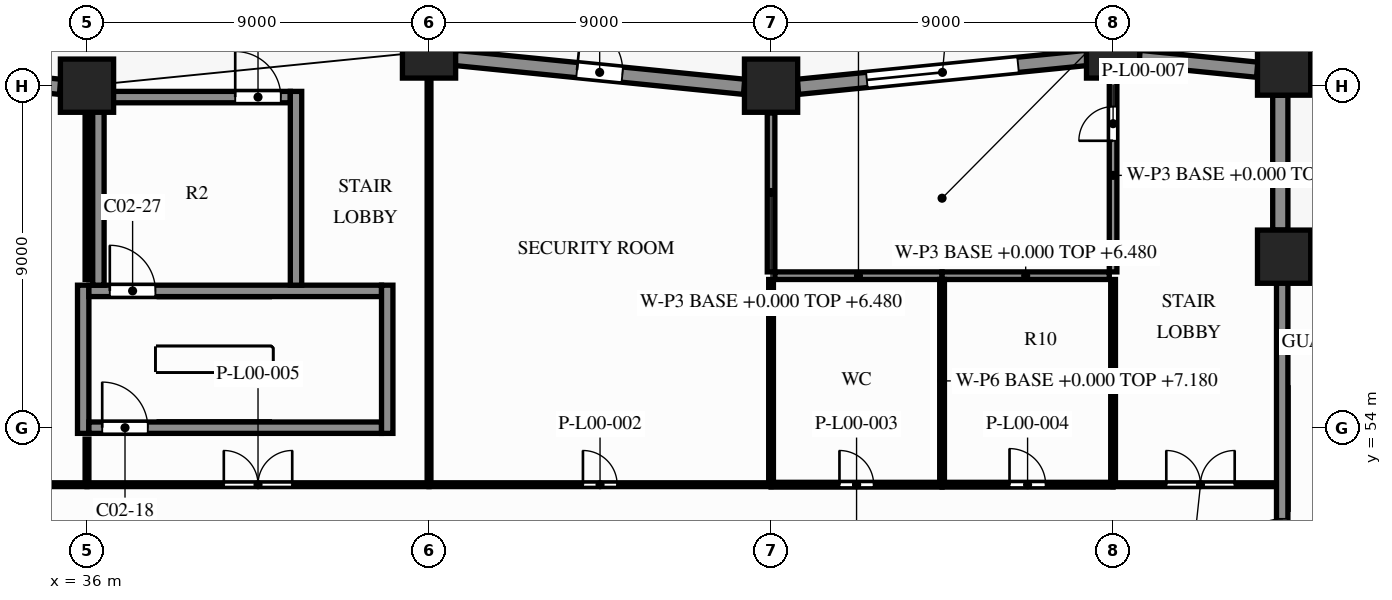
"""IFC4 building model, lengths in metres.
Left out: names, types, materials, properties, quantities, classifications, styles, units other than length and angle.
Written with IfcOpenShell. Run it as: python <this file> out.ifc"""

import sys

from ifc_helpers import new_model, si_unit, direction, frame, frame_2d, origin, origin_2d, place, context, subcontext, project, spatial, rectangle, extrude, element, fill, save


model = new_model("IFC4")
c1 = context("Model", 3, precision=1e-05, world=origin(), true_north=direction((0.0, 1.0)))
c2 = subcontext(c1, "Body", "Model", "MODEL_VIEW")
j1 = project(units=[si_unit("LENGTHUNIT", "METRE"), si_unit("PLANEANGLEUNIT", "RADIAN")], contexts=[c1])
p1 = place(None, origin())
s1 = spatial("IfcSite", under=j1, at=p1, CompositionType="ELEMENT")
p2 = place(p1, origin())
s2 = spatial("IfcBuilding", under=s1, at=p2, CompositionType="ELEMENT")
p3 = place(p2, origin())
s3 = spatial("IfcBuildingStorey", under=s2, at=p3, CompositionType="ELEMENT", Elevation=0.0)
for number, where, z_axis, x_axis in (
    (1, (67.5, 63.45, 0.0), (0.0, 0.0, 1.0), (1.0, 0.0, 0.0)),
    (2, (63.0, 63.9, 0.0), (0.0, 0.0, 1.0), (1.0, 0.0, 0.0)),
    (3, (54.0, 63.0, 0.0), (0.0, 0.0, 1.0), (1.0, 0.0, 0.0)),
    (4, (45.0, 63.9, 0.0), (0.0, 0.0, 1.0), (1.0, 0.0, 0.0)),
    (5, (36.0, 63.0, 0.0), (0.0, 0.0, 1.0), (1.0, 0.0, 0.0)),
    (6, (67.5, 58.5, 0.0), (0.0, 0.0, 1.0), (1.0, 0.0, 0.0)),
):
    element("IfcColumn", number, at=place(p3, frame(where, z_axis=z_axis, x_axis=x_axis)), inside=s3, PredefinedType="COLUMN", context=c2, shape_type="SweptSolid", body=[
        extrude(rectangle(XDim=1.4, YDim=1.4, at=origin_2d()), origin(), (0.0, 0.0, 1.0), 7.5),
    ])
p4 = place(p3, frame((67.4, 62.75, 0.0), z_axis=(0.0, 0.0, 1.0), x_axis=(0.0, -1.0, 0.0)))
e7 = element("IfcWall", 7, at=p4, inside=s3, PredefinedType="SOLIDWALL", context=c2, shape_type="SweptSolid", body=[
    extrude(rectangle(XDim=3.55, YDim=0.4, at=frame_2d((1.775, 0.0))), origin(), (0.0, 0.0, 1.0), 6.6),
])
p5 = place(p3, frame((63.687, 63.731, 0.0), z_axis=(0.0, 0.0, 1.0), x_axis=(0.995041834057, -0.099457269599, 0.0)))
e8 = element("IfcWall", 8, at=p5, inside=s3, PredefinedType="SOLIDWALL", context=c2, shape_type="SweptSolid", body=[
    extrude(rectangle(XDim=3.122, YDim=0.4, at=frame_2d((1.561, 0.0))), origin(), (0.0, 0.0, 1.0), 6.6),
])
p6 = place(p3, frame((54.707, 62.97, 0.0), z_axis=(0.0, 0.0, 1.0), x_axis=(0.995039719416, 0.099478423711, 0.0)))
e9 = element("IfcWall", 9, at=p6, inside=s3, PredefinedType="SOLIDWALL", context=c2, shape_type="SweptSolid", body=[
    extrude(rectangle(XDim=7.645, YDim=0.4, at=frame_2d((3.822, 0.0))), origin(), (0.0, 0.0, 1.0), 6.6),
])
p7 = place(p6, frame((1.823, 0.0, 0.0)))
e10 = element("IfcOpeningElement", 10, at=p7, cuts=e9, PredefinedType="OPENING", context=c2, shape_type="SweptSolid", body=[
    extrude(rectangle(XDim=4.0, YDim=4.0, at=frame_2d((2.0, 2.0))), frame((0.0, 0.21, 0.0), z_axis=(0.0, -1.0, 0.0), x_axis=(1.0, 0.0, 0.0)), (0.0, 0.0, 1.0), 0.42),
])
p8 = place(p3, frame((45.687, 63.731, 0.0), z_axis=(0.0, 0.0, 1.0), x_axis=(0.995039719416, -0.099478423711, 0.0)))
e11 = element("IfcWall", 11, at=p8, inside=s3, PredefinedType="SOLIDWALL", context=c2, shape_type="SweptSolid", body=[
    extrude(rectangle(XDim=7.645, YDim=0.4, at=frame_2d((3.822, 0.0))), origin(), (0.0, 0.0, 1.0), 6.6),
])
p9 = place(p8, frame((3.222, 0.0, 0.0)))
e12 = element("IfcOpeningElement", 12, at=p9, cuts=e11, PredefinedType="OPENING", context=c2, shape_type="SweptSolid", body=[
    extrude(rectangle(XDim=1.2, YDim=2.4, at=frame_2d((0.6, 1.2))), frame((0.0, 0.21, 0.0), z_axis=(0.0, -1.0, 0.0), x_axis=(1.0, 0.0, 0.0)), (0.0, 0.0, 1.0), 0.42),
])
p10 = place(p3, frame((27.687, 63.731, 0.0), z_axis=(0.0, 0.0, 1.0), x_axis=(0.995039719416, -0.099478423711, 0.0)))
e13 = element("IfcWall", 13, at=p10, inside=s3, PredefinedType="SOLIDWALL", context=c2, shape_type="SweptSolid", body=[
    extrude(rectangle(XDim=7.645, YDim=0.4, at=frame_2d((3.822, 0.0))), origin(), (0.0, 0.0, 1.0), 6.6),
])
p11 = place(p10, frame((3.222, 0.0, 0.0)))
e14 = element("IfcOpeningElement", 14, at=p11, cuts=e13, PredefinedType="OPENING", context=c2, shape_type="SweptSolid", body=[
    extrude(rectangle(XDim=1.2, YDim=2.4, at=frame_2d((0.6, 1.2))), frame((0.0, 0.21, 0.0), z_axis=(0.0, -1.0, 0.0), x_axis=(1.0, 0.0, 0.0)), (0.0, 0.0, 1.0), 0.42),
])
p12 = place(p3, frame((36.05, 54.0, 0.0), z_axis=(0.0, 0.0, 1.0), x_axis=(1.0, 0.0, 0.0)))
e15 = element("IfcWall", 15, at=p12, inside=s3, PredefinedType="SHEAR", context=c2, shape_type="SweptSolid", body=[
    extrude(rectangle(XDim=7.7, YDim=0.3, at=frame_2d((3.85, 0.0))), origin(), (0.0, 0.0, 1.0), 7.2),
])
p13 = place(p12, frame((0.35, 0.0, 0.0)))
e16 = element("IfcOpeningElement", 16, at=p13, cuts=e15, PredefinedType="OPENING", context=c2, shape_type="SweptSolid", body=[
    extrude(rectangle(XDim=1.2, YDim=2.2, at=frame_2d((0.6, 1.1))), frame((0.0, 0.16, 0.0), z_axis=(0.0, -1.0, 0.0), x_axis=(1.0, 0.0, 0.0)), (0.0, 0.0, 1.0), 0.32),
])
p14 = place(p3, frame((36.05, 57.6, 0.0), z_axis=(0.0, 0.0, 1.0), x_axis=(1.0, 0.0, 0.0)))
e17 = element("IfcWall", 17, at=p14, inside=s3, PredefinedType="SHEAR", context=c2, shape_type="SweptSolid", body=[
    extrude(rectangle(XDim=7.7, YDim=0.3, at=frame_2d((3.85, 0.0))), origin(), (0.0, 0.0, 1.0), 7.2),
])
p15 = place(p14, frame((0.55, 0.0, 0.0)))
e18 = element("IfcOpeningElement", 18, at=p15, cuts=e17, PredefinedType="OPENING", context=c2, shape_type="SweptSolid", body=[
    extrude(rectangle(XDim=1.2, YDim=2.2, at=frame_2d((0.6, 1.1))), frame((0.0, 0.16, 0.0), z_axis=(0.0, -1.0, 0.0), x_axis=(1.0, 0.0, 0.0)), (0.0, 0.0, 1.0), 0.32),
])
p16 = place(p3, frame((67.6, 58.15, 0.0), z_axis=(0.0, 0.0, 1.0), x_axis=(1.0, 0.0, 0.0)))
e19 = element("IfcWall", 19, at=p16, inside=s3, PredefinedType="SHEAR", context=c2, shape_type="SweptSolid", body=[
    extrude(rectangle(XDim=3.9, YDim=0.3, at=frame_2d((1.95, 0.0))), origin(), (0.0, 0.0, 1.0), 7.2),
])
p17 = place(p3, frame((36.45, 62.7, 0.0), z_axis=(0.0, 0.0, 1.0), x_axis=(1.0, 0.0, 0.0)))
e20 = element("IfcWall", 20, at=p17, inside=s3, PredefinedType="SHEAR", context=c2, shape_type="SweptSolid", body=[
    extrude(rectangle(XDim=4.9, YDim=0.3, at=frame_2d((2.45, 0.0))), origin(), (0.0, 0.0, 1.0), 7.2),
])
p18 = place(p17, frame((3.45, 0.0, 0.0)))
e21 = element("IfcOpeningElement", 21, at=p18, cuts=e20, PredefinedType="OPENING", context=c2, shape_type="SweptSolid", body=[
    extrude(rectangle(XDim=1.2, YDim=2.2, at=frame_2d((0.6, 1.1))), frame((0.0, 0.16, 0.0), z_axis=(0.0, -1.0, 0.0), x_axis=(1.0, 0.0, 0.0)), (0.0, 0.0, 1.0), 0.32),
])
p19 = place(p3, frame((35.9, 53.85, 0.0), z_axis=(0.0, 0.0, 1.0), x_axis=(0.0, 1.0, 0.0)))
e22 = element("IfcWall", 22, at=p19, inside=s3, PredefinedType="SHEAR", context=c2, shape_type="SweptSolid", body=[
    extrude(rectangle(XDim=3.9, YDim=0.3, at=frame_2d((1.95, 0.0))), origin(), (0.0, 0.0, 1.0), 7.2),
])
for number, where, z_axis, x_axis in (
    (23, (36.3, 57.75, 0.0), (0.0, 0.0, 1.0), (0.0, 1.0, 0.0)),
    (24, (41.5, 57.75, 0.0), (0.0, 0.0, 1.0), (0.0, 1.0, 0.0)),
):
    element("IfcWall", number, at=place(p3, frame(where, z_axis=z_axis, x_axis=x_axis)), inside=s3, PredefinedType="SHEAR", context=c2, shape_type="SweptSolid", body=[
        extrude(rectangle(XDim=5.1, YDim=0.3, at=frame_2d((2.55, 0.0))), origin(), (0.0, 0.0, 1.0), 7.2),
    ])
p20 = place(p3, frame((43.9, 53.85, 0.0), z_axis=(0.0, 0.0, 1.0), x_axis=(0.0, 1.0, 0.0)))
e25 = element("IfcWall", 25, at=p20, inside=s3, PredefinedType="SHEAR", context=c2, shape_type="SweptSolid", body=[
    extrude(rectangle(XDim=3.9, YDim=0.3, at=frame_2d((1.95, 0.0))), origin(), (0.0, 0.0, 1.0), 7.2),
])
p21 = place(p3, frame((67.45, 49.7, 0.0), z_axis=(0.0, 0.0, 1.0), x_axis=(0.0, 1.0, 0.0)))
e26 = element("IfcWall", 26, at=p21, inside=s3, PredefinedType="SHEAR", context=c2, shape_type="SweptSolid", body=[
    extrude(rectangle(XDim=8.6, YDim=0.3, at=frame_2d((4.3, 0.0))), origin(), (0.0, 0.0, 1.0), 7.2),
])
p22 = place(p21, frame((0.7, 0.0, 0.0)))
e27 = element("IfcOpeningElement", 27, at=p22, cuts=e26, PredefinedType="OPENING", context=c2, shape_type="SweptSolid", body=[
    extrude(rectangle(XDim=1.2, YDim=2.2, at=frame_2d((0.6, 1.1))), frame((0.0, 0.16, 0.0), z_axis=(0.0, -1.0, 0.0), x_axis=(1.0, 0.0, 0.0)), (0.0, 0.0, 1.0), 0.32),
])
p23 = place(p3, frame((27.15, 52.5, 0.0), z_axis=(0.0, 0.0, 1.0), x_axis=(1.0, 0.0, 0.0)))
e28 = element("IfcWall", 28, at=p23, inside=s3, PredefinedType="PARTITIONING", context=c2, shape_type="SweptSolid", body=[
    extrude(rectangle(XDim=8.85, YDim=0.1, at=frame_2d((4.425, 0.0))), origin(), (0.0, 0.0, 1.0), 6.48),
])
p24 = place(p23, frame((3.9, 0.0, 0.0)))
e29 = element("IfcOpeningElement", 29, at=p24, cuts=e28, PredefinedType="OPENING", context=c2, shape_type="SweptSolid", body=[
    extrude(rectangle(XDim=0.9, YDim=2.1, at=frame_2d((0.45, 1.05))), frame((0.0, 0.06, 0.0), z_axis=(0.0, -1.0, 0.0), x_axis=(1.0, 0.0, 0.0)), (0.0, 0.0, 1.0), 0.12),
])
p25 = place(p3, frame((36.0, 52.5, 0.0), z_axis=(0.0, 0.0, 1.0), x_axis=(1.0, 0.0, 0.0)))
e30 = element("IfcWall", 30, at=p25, inside=s3, PredefinedType="PARTITIONING", context=c2, shape_type="SweptSolid", body=[
    extrude(rectangle(XDim=9.0, YDim=0.1, at=frame_2d((4.5, 0.0))), origin(), (0.0, 0.0, 1.0), 6.48),
])
p26 = place(p25, frame((3.6, 0.0, 0.0)))
e31 = element("IfcOpeningElement", 31, at=p26, cuts=e30, PredefinedType="OPENING", context=c2, shape_type="SweptSolid", body=[
    extrude(rectangle(XDim=1.8, YDim=2.1, at=frame_2d((0.9, 1.05))), frame((0.0, 0.06, 0.0), z_axis=(0.0, -1.0, 0.0), x_axis=(1.0, 0.0, 0.0)), (0.0, 0.0, 1.0), 0.12),
])
p27 = place(p3, frame((45.0, 52.5, 0.0), z_axis=(0.0, 0.0, 1.0), x_axis=(1.0, 0.0, 0.0)))
e32 = element("IfcWall", 32, at=p27, inside=s3, PredefinedType="PARTITIONING", context=c2, shape_type="SweptSolid", body=[
    extrude(rectangle(XDim=9.0, YDim=0.1, at=frame_2d((4.5, 0.0))), origin(), (0.0, 0.0, 1.0), 6.48),
])
p28 = place(p27, frame((4.05, 0.0, 0.0)))
e33 = element("IfcOpeningElement", 33, at=p28, cuts=e32, PredefinedType="OPENING", context=c2, shape_type="SweptSolid", body=[
    extrude(rectangle(XDim=0.9, YDim=2.1, at=frame_2d((0.45, 1.05))), frame((0.0, 0.06, 0.0), z_axis=(0.0, -1.0, 0.0), x_axis=(1.0, 0.0, 0.0)), (0.0, 0.0, 1.0), 0.12),
])
p29 = place(p3, frame((54.0, 52.5, 0.0), z_axis=(0.0, 0.0, 1.0), x_axis=(1.0, 0.0, 0.0)))
e34 = element("IfcWall", 34, at=p29, inside=s3, PredefinedType="PARTITIONING", context=c2, shape_type="SweptSolid", body=[
    extrude(rectangle(XDim=4.5, YDim=0.125, at=frame_2d((2.25, 0.0))), origin(), (0.0, 0.0, 1.0), 6.48),
])
p30 = place(p29, frame((1.8, 0.0, 0.0)))
e35 = element("IfcOpeningElement", 35, at=p30, cuts=e34, PredefinedType="OPENING", context=c2, shape_type="SweptSolid", body=[
    extrude(rectangle(XDim=0.9, YDim=2.1, at=frame_2d((0.45, 1.05))), frame((0.0, 0.073, 0.0), z_axis=(0.0, -1.0, 0.0), x_axis=(1.0, 0.0, 0.0)), (0.0, 0.0, 1.0), 0.145),
])
p31 = place(p3, frame((58.5, 52.5, 0.0), z_axis=(0.0, 0.0, 1.0), x_axis=(1.0, 0.0, 0.0)))
e36 = element("IfcWall", 36, at=p31, inside=s3, PredefinedType="PARTITIONING", context=c2, shape_type="SweptSolid", body=[
    extrude(rectangle(XDim=4.5, YDim=0.125, at=frame_2d((2.25, 0.0))), origin(), (0.0, 0.0, 1.0), 6.48),
])
p32 = place(p31, frame((1.775, 0.0, 0.0)))
e37 = element("IfcOpeningElement", 37, at=p32, cuts=e36, PredefinedType="OPENING", context=c2, shape_type="SweptSolid", body=[
    extrude(rectangle(XDim=0.95, YDim=2.1, at=frame_2d((0.475, 1.05))), frame((0.0, 0.073, 0.0), z_axis=(0.0, -1.0, 0.0), x_axis=(1.0, 0.0, 0.0)), (0.0, 0.0, 1.0), 0.145),
])
p33 = place(p3, frame((63.0, 52.5, 0.0), z_axis=(0.0, 0.0, 1.0), x_axis=(1.0, 0.0, 0.0)))
e38 = element("IfcWall", 38, at=p33, inside=s3, PredefinedType="PARTITIONING", context=c2, shape_type="SweptSolid", body=[
    extrude(rectangle(XDim=4.3, YDim=0.1, at=frame_2d((2.15, 0.0))), origin(), (0.0, 0.0, 1.0), 6.48),
])
p34 = place(p33, frame((1.4, 0.0, 0.0)))
e39 = element("IfcOpeningElement", 39, at=p34, cuts=e38, PredefinedType="OPENING", context=c2, shape_type="SweptSolid", body=[
    extrude(rectangle(XDim=1.8, YDim=2.1, at=frame_2d((0.9, 1.05))), frame((0.0, 0.06, 0.0), z_axis=(0.0, -1.0, 0.0), x_axis=(1.0, 0.0, 0.0)), (0.0, 0.0, 1.0), 0.12),
])
p35 = place(p3, frame((36.0, 53.7, 0.0), z_axis=(0.0, 0.0, 1.0), x_axis=(0.0, -1.0, 0.0)))
e40 = element("IfcWall", 40, at=p35, inside=s3, PredefinedType="PARTITIONING", context=c2, shape_type="SweptSolid", body=[
    extrude(rectangle(XDim=1.15, YDim=0.1, at=frame_2d((0.575, 0.0))), origin(), (0.0, 0.0, 1.0), 6.48),
])
p36 = place(p3, frame((54.0, 57.9, 0.0), z_axis=(0.0, 0.0, 1.0), x_axis=(0.0, -1.0, 0.0)))
e41 = element("IfcWall", 41, at=p36, inside=s3, PredefinedType="PARTITIONING", context=c2, shape_type="SweptSolid", body=[
    extrude(rectangle(XDim=5.337, YDim=0.125, at=frame_2d((2.669, 0.0))), origin(), (0.0, 0.0, 1.0), 6.48),
])
p37 = place(p3, frame((58.5, 57.9, 0.0), z_axis=(0.0, 0.0, 1.0), x_axis=(0.0, -1.0, 0.0)))
e42 = element("IfcWall", 42, at=p37, inside=s3, PredefinedType="PARTITIONING", context=c2, shape_type="SweptSolid", body=[
    extrude(rectangle(XDim=5.337, YDim=0.125, at=frame_2d((2.669, 0.0))), origin(), (0.0, 0.0, 1.0), 7.18),
])
p38 = place(p3, frame((63.0, 57.9, 0.0), z_axis=(0.0, 0.0, 1.0), x_axis=(0.0, -1.0, 0.0)))
e43 = element("IfcWall", 43, at=p38, inside=s3, PredefinedType="PARTITIONING", context=c2, shape_type="SweptSolid", body=[
    extrude(rectangle(XDim=5.337, YDim=0.125, at=frame_2d((2.669, 0.0))), origin(), (0.0, 0.0, 1.0), 6.48),
])
for number, where, z_axis, x_axis in (
    (44, (54.1, 58.0, 0.0), (0.0, 0.0, 1.0), (1.0, 0.0, 0.0)),
    (45, (58.5, 58.0, 0.0), (0.0, 0.0, 1.0), (1.0, 0.0, 0.0)),
):
    element("IfcWall", number, at=place(p3, frame(where, z_axis=z_axis, x_axis=x_axis)), inside=s3, PredefinedType="PARTITIONING", context=c2, shape_type="SweptSolid", body=[
        extrude(rectangle(XDim=4.4, YDim=0.2, at=frame_2d((2.2, 0.0))), origin(), (0.0, 0.0, 1.0), 6.48),
    ])
p39 = place(p3, frame((36.0, 62.28, 0.0), z_axis=(0.0, 0.0, 1.0), x_axis=(0.0, -1.0, 0.0)))
e46 = element("IfcWall", 46, at=p39, inside=s3, PredefinedType="PARTITIONING", context=c2, shape_type="SweptSolid", body=[
    extrude(rectangle(XDim=4.38, YDim=0.1, at=frame_2d((2.19, 0.0))), origin(), (0.0, 0.0, 1.0), 6.48),
])
p40 = place(p3, frame((54.0, 62.28, 0.0), z_axis=(0.0, 0.0, 1.0), x_axis=(0.0, -1.0, 0.0)))
e47 = element("IfcWall", 47, at=p40, inside=s3, PredefinedType="PARTITIONING", context=c2, shape_type="SweptSolid", body=[
    extrude(rectangle(XDim=4.18, YDim=0.2, at=frame_2d((2.09, 0.0))), origin(), (0.0, 0.0, 1.0), 6.48),
])
p41 = place(p3, frame((45.0, 63.18, 0.0), z_axis=(0.0, 0.0, 1.0), x_axis=(0.0, -1.0, 0.0)))
e48 = element("IfcWall", 48, at=p41, inside=s3, PredefinedType="PARTITIONING", context=c2, shape_type="SweptSolid", body=[
    extrude(rectangle(XDim=10.63, YDim=0.1, at=frame_2d((5.315, 0.0))), origin(), (0.0, 0.0, 1.0), 6.48),
])
p42 = place(p3, frame((63.0, 58.1, 0.0), z_axis=(0.0, 0.0, 1.0), x_axis=(0.0, 1.0, 0.0)))
e49 = element("IfcWall", 49, at=p42, inside=s3, PredefinedType="PARTITIONING", context=c2, shape_type="SweptSolid", body=[
    extrude(rectangle(XDim=5.08, YDim=0.2, at=frame_2d((2.54, 0.0))), origin(), (0.0, 0.0, 1.0), 6.48),
])
p43 = place(p42, frame((3.45, 0.0, 0.0)))
e50 = element("IfcOpeningElement", 50, at=p43, cuts=e49, PredefinedType="OPENING", context=c2, shape_type="SweptSolid", body=[
    extrude(rectangle(XDim=0.9, YDim=2.1, at=frame_2d((0.45, 1.05))), frame((0.0, 0.11, 0.0), z_axis=(0.0, -1.0, 0.0), x_axis=(1.0, 0.0, 0.0)), (0.0, 0.0, 1.0), 0.22),
])
p44 = place(p7, origin())
e51 = element("IfcDoor", 51, at=p44, inside=s3, OperationType="ROLLINGUP", PredefinedType="DOOR", context=c2, shape_type="SweptSolid", body=[
    extrude(rectangle(XDim=4.0, YDim=4.0, at=frame_2d((2.0, 2.0))), frame((0.0, 0.025, 0.0), z_axis=(0.0, -1.0, 0.0), x_axis=(1.0, 0.0, 0.0)), (0.0, 0.0, 1.0), 0.05),
])
fill(e10, e51)
p45 = place(p9, origin())
e52 = element("IfcDoor", 52, at=p45, inside=s3, OperationType="SINGLE_SWING_RIGHT", PredefinedType="DOOR", context=c2, shape_type="SweptSolid", body=[
    extrude(rectangle(XDim=1.2, YDim=2.4, at=frame_2d((0.6, 1.2))), frame((0.0, 0.025, 0.0), z_axis=(0.0, -1.0, 0.0), x_axis=(1.0, 0.0, 0.0)), (0.0, 0.0, 1.0), 0.05),
])
fill(e12, e52)
p46 = place(p22, origin())
e53 = element("IfcDoor", 53, at=p46, inside=s3, OperationType="SINGLE_SWING_RIGHT", PredefinedType="DOOR", context=c2, shape_type="SweptSolid", body=[
    extrude(rectangle(XDim=1.2, YDim=2.2, at=frame_2d((0.6, 1.1))), frame((0.0, 0.025, 0.0), z_axis=(0.0, -1.0, 0.0), x_axis=(1.0, 0.0, 0.0)), (0.0, 0.0, 1.0), 0.05),
])
fill(e27, e53)
p47 = place(p13, origin())
e54 = element("IfcDoor", 54, at=p47, inside=s3, OperationType="SINGLE_SWING_LEFT", PredefinedType="DOOR", context=c2, shape_type="SweptSolid", body=[
    extrude(rectangle(XDim=1.2, YDim=2.2, at=frame_2d((0.6, 1.1))), frame((0.0, 0.025, 0.0), z_axis=(0.0, -1.0, 0.0), x_axis=(1.0, 0.0, 0.0)), (0.0, 0.0, 1.0), 0.05),
])
fill(e16, e54)
p48 = place(p15, origin())
e55 = element("IfcDoor", 55, at=p48, inside=s3, OperationType="SINGLE_SWING_RIGHT", PredefinedType="DOOR", context=c2, shape_type="SweptSolid", body=[
    extrude(rectangle(XDim=1.2, YDim=2.2, at=frame_2d((0.6, 1.1))), frame((0.0, 0.025, 0.0), z_axis=(0.0, -1.0, 0.0), x_axis=(1.0, 0.0, 0.0)), (0.0, 0.0, 1.0), 0.05),
])
fill(e18, e55)
p49 = place(p18, origin())
e56 = element("IfcDoor", 56, at=p49, inside=s3, OperationType="SINGLE_SWING_LEFT", PredefinedType="DOOR", context=c2, shape_type="SweptSolid", body=[
    extrude(rectangle(XDim=1.2, YDim=2.2, at=frame_2d((0.6, 1.1))), frame((0.0, 0.025, 0.0), z_axis=(0.0, -1.0, 0.0), x_axis=(1.0, 0.0, 0.0)), (0.0, 0.0, 1.0), 0.05),
])
fill(e21, e56)
p50 = place(p28, origin())
e57 = element("IfcDoor", 57, at=p50, inside=s3, OperationType="SINGLE_SWING_RIGHT", PredefinedType="DOOR", context=c2, shape_type="SweptSolid", body=[
    extrude(rectangle(XDim=0.9, YDim=2.1, at=frame_2d((0.45, 1.05))), frame((0.0, 0.025, 0.0), z_axis=(0.0, -1.0, 0.0), x_axis=(1.0, 0.0, 0.0)), (0.0, 0.0, 1.0), 0.05),
])
fill(e33, e57)
p51 = place(p30, origin())
e58 = element("IfcDoor", 58, at=p51, inside=s3, OperationType="SINGLE_SWING_LEFT", PredefinedType="DOOR", context=c2, shape_type="SweptSolid", body=[
    extrude(rectangle(XDim=0.9, YDim=2.1, at=frame_2d((0.45, 1.05))), frame((0.0, 0.025, 0.0), z_axis=(0.0, -1.0, 0.0), x_axis=(1.0, 0.0, 0.0)), (0.0, 0.0, 1.0), 0.05),
])
fill(e35, e58)
p52 = place(p32, origin())
e59 = element("IfcDoor", 59, at=p52, inside=s3, OperationType="SINGLE_SWING_LEFT", PredefinedType="DOOR", context=c2, shape_type="SweptSolid", body=[
    extrude(rectangle(XDim=0.95, YDim=2.1, at=frame_2d((0.475, 1.05))), frame((0.0, 0.025, 0.0), z_axis=(0.0, -1.0, 0.0), x_axis=(1.0, 0.0, 0.0)), (0.0, 0.0, 1.0), 0.05),
])
fill(e37, e59)
p53 = place(p26, origin())
e60 = element("IfcDoor", 60, at=p53, inside=s3, OperationType="DOUBLE_DOOR_SINGLE_SWING", PredefinedType="DOOR", context=c2, shape_type="SweptSolid", body=[
    extrude(rectangle(XDim=1.8, YDim=2.1, at=frame_2d((0.9, 1.05))), frame((0.0, 0.025, 0.0), z_axis=(0.0, -1.0, 0.0), x_axis=(1.0, 0.0, 0.0)), (0.0, 0.0, 1.0), 0.05),
])
fill(e31, e60)
p54 = place(p34, origin())
e61 = element("IfcDoor", 61, at=p54, inside=s3, OperationType="DOUBLE_DOOR_SINGLE_SWING", PredefinedType="DOOR", context=c2, shape_type="SweptSolid", body=[
    extrude(rectangle(XDim=1.8, YDim=2.1, at=frame_2d((0.9, 1.05))), frame((0.0, 0.025, 0.0), z_axis=(0.0, -1.0, 0.0), x_axis=(1.0, 0.0, 0.0)), (0.0, 0.0, 1.0), 0.05),
])
fill(e39, e61)
p55 = place(p43, origin())
e62 = element("IfcDoor", 62, at=p55, inside=s3, OperationType="SINGLE_SWING_LEFT", PredefinedType="DOOR", context=c2, shape_type="SweptSolid", body=[
    extrude(rectangle(XDim=0.9, YDim=2.1, at=frame_2d((0.45, 1.05))), frame((0.0, 0.025, 0.0), z_axis=(0.0, -1.0, 0.0), x_axis=(1.0, 0.0, 0.0)), (0.0, 0.0, 1.0), 0.05),
])
fill(e50, e62)
save(model, sys.argv[1])
